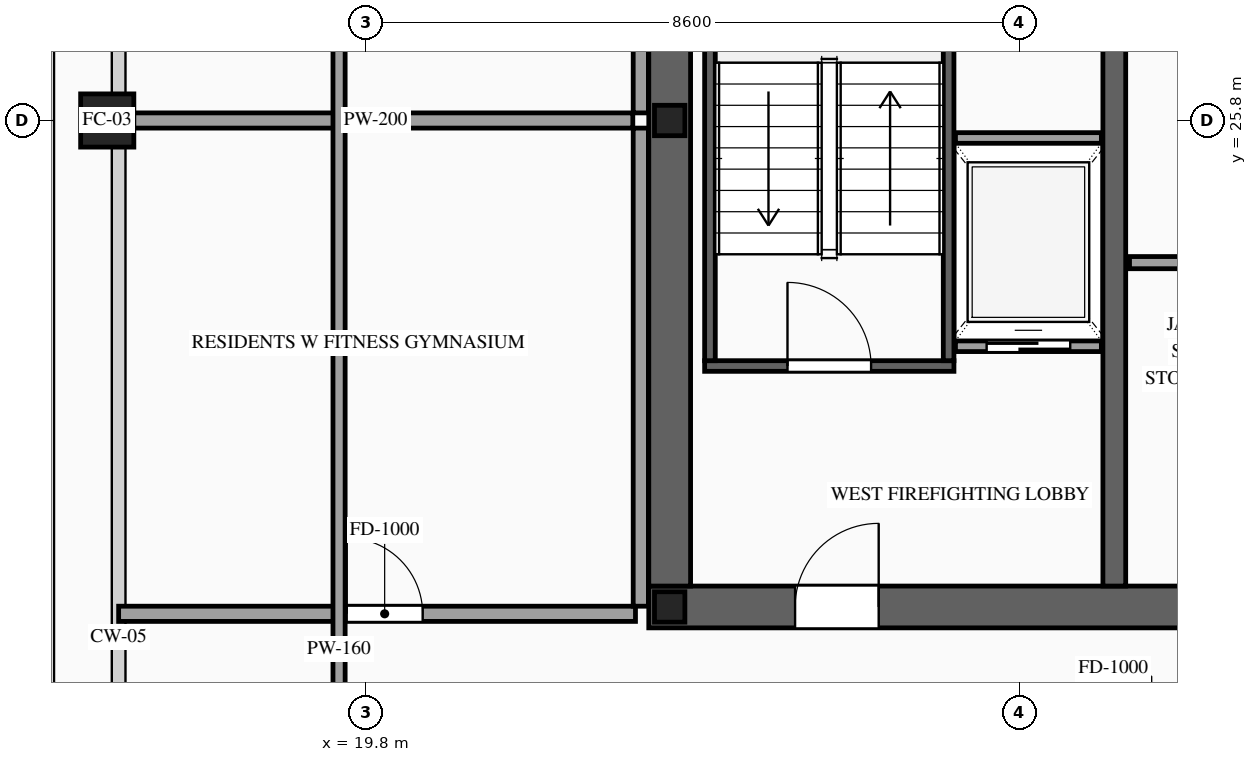
"""IFC4 building model, lengths in metres.
Left out: names, types, materials, properties, quantities, classifications, styles, units other than length and angle.
Written with IfcOpenShell. Run it as: python <this file> out.ifc"""

import sys

from ifc_helpers import new_model, si_unit, direction, frame, frame_2d, origin, origin_2d, place, context, subcontext, project, spatial, rectangle, hollow_rectangle, i_section, extrude, source, transform, mapped, element, fill, save


model = new_model("IFC4")
c1 = context("Model", 3, precision=1e-05, world=origin(), true_north=direction((0.0, 1.0)))
c2 = subcontext(c1, "Body", "Model", "MODEL_VIEW")
j1 = project(units=[si_unit("LENGTHUNIT", "METRE"), si_unit("PLANEANGLEUNIT", "RADIAN")], contexts=[c1])
p1 = place(None, origin())
s1 = spatial("IfcSite", under=j1, at=p1, CompositionType="ELEMENT")
p2 = place(p1, origin())
s2 = spatial("IfcBuilding", under=s1, at=p2, CompositionType="ELEMENT")
p3 = place(p2, frame((0.0, 0.0, 255.6)))
s3 = spatial("IfcBuildingStorey", under=s2, at=p3, CompositionType="ELEMENT", Elevation=255.6)
p4 = place(p3, frame((23.525, 19.4, 0.0), z_axis=(0.0, 0.0, 1.0), x_axis=(1.0, 0.0, 0.0)))
e1 = element("IfcWall", 1, at=p4, inside=s3, PredefinedType="SHEAR", context=c2, shape_type="SweptSolid", body=[
    extrude(rectangle(XDim=26.95, YDim=0.55, at=frame_2d((13.475, 0.0))), origin(), (0.0, 0.0, 1.0), 3.5),
])
p5 = place(p4, frame((1.925, 0.0, 0.0)))
e2 = element("IfcOpeningElement", 2, at=p5, cuts=e1, PredefinedType="OPENING", context=c2, shape_type="SweptSolid", body=[
    extrude(rectangle(XDim=1.1, YDim=2.2, at=frame_2d((0.55, 1.1))), frame((0.0, 0.29, 0.0), z_axis=(0.0, -1.0, 0.0), x_axis=(1.0, 0.0, 0.0)), (0.0, 0.0, 1.0), 0.58),
])
p6 = place(p4, frame((9.825, 0.0, 0.0)))
e3 = element("IfcOpeningElement", 3, at=p6, cuts=e1, PredefinedType="OPENING", context=c2, shape_type="SweptSolid", body=[
    extrude(rectangle(XDim=1.1, YDim=2.2, at=frame_2d((0.55, 1.1))), frame((0.0, 0.29, 0.0), z_axis=(0.0, -1.0, 0.0), x_axis=(1.0, 0.0, 0.0)), (0.0, 0.0, 1.0), 0.58),
])
p7 = place(p4, frame((23.025, 0.0, 0.0)))
e4 = element("IfcOpeningElement", 4, at=p7, cuts=e1, PredefinedType="OPENING", context=c2, shape_type="SweptSolid", body=[
    extrude(rectangle(XDim=1.1, YDim=2.2, at=frame_2d((0.55, 1.1))), frame((0.0, 0.29, 0.0), z_axis=(0.0, -1.0, 0.0), x_axis=(1.0, 0.0, 0.0)), (0.0, 0.0, 1.0), 0.58),
])
p8 = place(p4, frame((19.645, 0.0, 0.0)))
e5 = element("IfcOpeningElement", 5, at=p8, cuts=e1, PredefinedType="OPENING", context=c2, shape_type="SweptSolid", body=[
    extrude(rectangle(XDim=0.9, YDim=2.15, at=frame_2d((0.45, 1.075))), frame((0.0, 0.29, 0.0), z_axis=(0.0, -1.0, 0.0), x_axis=(1.0, 0.0, 0.0)), (0.0, 0.0, 1.0), 0.58),
])
p9 = place(p4, frame((18.205, 0.0, 0.0)))
e6 = element("IfcOpeningElement", 6, at=p9, cuts=e1, PredefinedType="OPENING", context=c2, shape_type="SweptSolid", body=[
    extrude(rectangle(XDim=0.9, YDim=2.15, at=frame_2d((0.45, 1.075))), frame((0.0, 0.29, 0.0), z_axis=(0.0, -1.0, 0.0), x_axis=(1.0, 0.0, 0.0)), (0.0, 0.0, 1.0), 0.58),
])
m1 = source(origin(), c2, "Body", "SweptSolid", [
    extrude(rectangle(XDim=12.25, YDim=0.55, at=frame_2d((6.125, 0.0))), origin(), (0.0, 0.0, 1.0), 3.5),
])
p10 = place(p3, frame((23.8, 19.675, 0.0), z_axis=(0.0, 0.0, 1.0), x_axis=(0.0, 1.0, 0.0)))
e7 = element("IfcWall", 7, at=p10, inside=s3, PredefinedType="SHEAR", context=c2, shape_type="MappedRepresentation", body=[
    mapped(m1, transform((0.0, 0.0, 0.0), scale=1.0)),
])
m2 = source(origin(), c2, "Body", "SweptSolid", [
    extrude(rectangle(XDim=12.25, YDim=0.3, at=frame_2d((6.125, 0.0))), origin(), (0.0, 0.0, 1.0), 3.5),
])
p11 = place(p3, frame((29.65, 19.675, 0.0), z_axis=(0.0, 0.0, 1.0), x_axis=(0.0, 1.0, 0.0)))
e8 = element("IfcWall", 8, at=p11, inside=s3, PredefinedType="SOLIDWALL", context=c2, shape_type="MappedRepresentation", body=[
    mapped(m2, transform((0.0, 0.0, 0.0), scale=1.0)),
])
m3 = source(origin(), c2, "Body", "SweptSolid", [
    extrude(i_section(OverallWidth=0.4, OverallDepth=0.4, WebThickness=0.013, FlangeThickness=0.021, at=origin_2d()), origin(), (0.0, 0.0, 1.0), 3.5),
])
for number, where, z_axis, x_axis in (
    (9, (23.8, 19.4, 0.0), (0.0, 0.0, 1.0), (1.0, 0.0, 0.0)),
    (10, (23.8, 25.8, 0.0), (0.0, 0.0, 1.0), (1.0, 0.0, 0.0)),
):
    element("IfcColumn", number, at=place(p3, frame(where, z_axis=z_axis, x_axis=x_axis)), inside=s3, PredefinedType="COLUMN", context=c2, shape_type="MappedRepresentation", body=[
        mapped(m3, transform((0.0, 0.0, 0.0), scale=1.0)),
    ])
m4 = source(origin(), c2, "Body", "SweptSolid", [
    extrude(hollow_rectangle(XDim=0.7, YDim=0.7, WallThickness=0.032, at=origin_2d()), origin(), (0.0, 0.0, 1.0), 3.5),
])
p12 = place(p3, frame((16.4, 25.8, 0.0), z_axis=(0.0, 0.0, 1.0), x_axis=(1.0, 0.0, 0.0)))
e11 = element("IfcColumn", 11, at=p12, inside=s3, PredefinedType="COLUMN", context=c2, shape_type="MappedRepresentation", body=[
    mapped(m4, transform((0.0, 0.0, 0.0), scale=1.0)),
])
p13 = place(p3, frame((27.56, 22.83, 0.0), z_axis=(0.0, 0.0, 1.0), x_axis=(1.0, 0.0, 0.0)))
e12 = element("IfcWall", 12, at=p13, inside=s3, PredefinedType="SOLIDWALL", context=c2, shape_type="SweptSolid", body=[
    extrude(rectangle(XDim=1.92, YDim=0.14, at=frame_2d((0.96, 0.0))), origin(), (0.0, 0.0, 1.0), 3.2),
])
p14 = place(p13, frame((0.41, 0.0, 0.0)))
e13 = element("IfcOpeningElement", 13, at=p14, cuts=e12, PredefinedType="OPENING", context=c2, shape_type="SweptSolid", body=[
    extrude(rectangle(XDim=1.1, YDim=2.2, at=frame_2d((0.55, 1.1))), frame((0.0, 0.085, 0.0), z_axis=(0.0, -1.0, 0.0), x_axis=(1.0, 0.0, 0.0)), (0.0, 0.0, 1.0), 0.17),
])
m5 = source(origin(), c2, "Body", "SweptSolid", [
    extrude(rectangle(XDim=1.92, YDim=0.14, at=frame_2d((0.96, 0.0))), origin(), (0.0, 0.0, 1.0), 3.2),
])
p15 = place(p3, frame((27.56, 25.57, 0.0), z_axis=(0.0, 0.0, 1.0), x_axis=(1.0, 0.0, 0.0)))
e14 = element("IfcWall", 14, at=p15, inside=s3, PredefinedType="SOLIDWALL", context=c2, shape_type="MappedRepresentation", body=[
    mapped(m5, transform((0.0, 0.0, 0.0), scale=1.0)),
])
p16 = place(p3, frame((24.26, 22.57, 0.0), z_axis=(0.0, 0.0, 1.0), x_axis=(1.0, 0.0, 0.0)))
e15 = element("IfcWall", 15, at=p16, inside=s3, PredefinedType="SOLIDWALL", context=c2, shape_type="SweptSolid", body=[
    extrude(rectangle(XDim=3.28, YDim=0.14, at=frame_2d((1.64, 0.0))), origin(), (0.0, 0.0, 1.0), 3.2),
])
p17 = place(p16, frame((1.09, 0.0, 0.0)))
e16 = element("IfcOpeningElement", 16, at=p17, cuts=e15, PredefinedType="OPENING", context=c2, shape_type="SweptSolid", body=[
    extrude(rectangle(XDim=1.1, YDim=2.2, at=frame_2d((0.55, 1.1))), frame((0.0, 0.085, 0.0), z_axis=(0.0, -1.0, 0.0), x_axis=(1.0, 0.0, 0.0)), (0.0, 0.0, 1.0), 0.17),
])
m6 = source(origin(), c2, "Body", "SweptSolid", [
    extrude(rectangle(XDim=8.94, YDim=0.14, at=frame_2d((4.47, 0.0))), origin(), (0.0, 0.0, 1.0), 3.2),
])
for number, where, z_axis, x_axis in (
    (17, (24.33, 22.64, 0.0), (0.0, 0.0, 1.0), (0.0, 1.0, 0.0)),
    (18, (27.47, 22.64, 0.0), (0.0, 0.0, 1.0), (0.0, 1.0, 0.0)),
):
    element("IfcWall", number, at=place(p3, frame(where, z_axis=z_axis, x_axis=x_axis)), inside=s3, PredefinedType="SOLIDWALL", context=c2, shape_type="MappedRepresentation", body=[
        mapped(m6, transform((0.0, 0.0, 0.0), scale=1.0)),
    ])
m7 = source(origin(), c2, "Body", "SweptSolid", [
    extrude(rectangle(XDim=2.47, YDim=0.16, at=frame_2d((1.235, 0.0))), origin(), (0.0, 0.0, 1.0), 3.2),
])
p18 = place(p3, frame((29.85, 23.93, 0.0), z_axis=(0.0, 0.0, 1.0), x_axis=(1.0, 0.0, 0.0)))
e19 = element("IfcWall", 19, at=p18, inside=s3, PredefinedType="PARTITIONING", context=c2, shape_type="MappedRepresentation", body=[
    mapped(m7, transform((0.0, 0.0, 0.0), scale=1.0)),
])
p19 = place(p3, frame((16.55, 19.31, 0.0), z_axis=(0.0, 0.0, 1.0), x_axis=(1.0, 0.0, 0.0)))
e20 = element("IfcWall", 20, at=p19, inside=s3, PredefinedType="PARTITIONING", context=c2, shape_type="SweptSolid", body=[
    extrude(rectangle(XDim=6.8, YDim=0.2, at=frame_2d((3.4, 0.0))), origin(), (0.0, 0.0, 1.0), 2.745),
])
p20 = place(p19, frame((3.0, 0.0, 0.0)))
e21 = element("IfcOpeningElement", 21, at=p20, cuts=e20, PredefinedType="OPENING", context=c2, shape_type="SweptSolid", body=[
    extrude(rectangle(XDim=1.0, YDim=2.2, at=frame_2d((0.5, 1.1))), frame((0.0, 0.115, 0.0), z_axis=(0.0, -1.0, 0.0), x_axis=(1.0, 0.0, 0.0)), (0.0, 0.0, 1.0), 0.23),
])
m8 = source(origin(), c2, "Body", "SweptSolid", [
    extrude(rectangle(XDim=6.765, YDim=0.2, at=frame_2d((3.382, 0.0))), origin(), (0.0, 0.0, 1.0), 2.707),
])
p21 = place(p3, frame((16.55, 25.8, 0.0), z_axis=(0.0, 0.0, 1.0), x_axis=(1.0, 0.0, 0.0)))
e22 = element("IfcWall", 22, at=p21, inside=s3, PredefinedType="PARTITIONING", context=c2, shape_type="MappedRepresentation", body=[
    mapped(m8, transform((0.0, 0.0, 0.0), scale=1.0)),
])
m9 = source(origin(), c2, "Body", "SweptSolid", [
    extrude(rectangle(XDim=6.29, YDim=0.2, at=frame_2d((3.145, 0.0))), origin(), (0.0, 0.0, 1.0), 3.2),
])
p22 = place(p3, frame((23.42, 19.41, 0.0), z_axis=(0.0, 0.0, 1.0), x_axis=(0.0, 1.0, 0.0)))
e23 = element("IfcWall", 23, at=p22, inside=s3, PredefinedType="PARTITIONING", context=c2, shape_type="MappedRepresentation", body=[
    mapped(m9, transform((0.0, 0.0, 0.0), scale=1.0)),
])
m10 = source(origin(), c2, "Body", "SweptSolid", [
    extrude(rectangle(XDim=26.69, YDim=0.16, at=frame_2d((13.345, 0.0))), origin(), (0.0, 0.0, 1.0), 3.2),
])
p23 = place(p3, frame((19.45, 5.5, 0.0), z_axis=(0.0, 0.0, 1.0), x_axis=(0.0, 1.0, 0.0)))
e24 = element("IfcWall", 24, at=p23, inside=s3, PredefinedType="PARTITIONING", context=c2, shape_type="MappedRepresentation", body=[
    mapped(m10, transform((0.0, 0.0, 0.0), scale=1.0)),
])
p24 = place(p3, frame((23.42, 25.9, 0.0), z_axis=(0.0, 0.0, 1.0), x_axis=(0.0, 1.0, 0.0)))
e25 = element("IfcWall", 25, at=p24, inside=s3, PredefinedType="PARTITIONING", context=c2, shape_type="MappedRepresentation", body=[
    mapped(m9, transform((0.0, 0.0, 0.0), scale=1.0)),
])
m11 = source(origin(), c2, "Body", "SweptSolid", [
    extrude(rectangle(XDim=1.1, YDim=2.2, at=frame_2d((0.55, 1.1))), frame((0.0, 0.025, 0.0), z_axis=(0.0, -1.0, 0.0), x_axis=(1.0, 0.0, 0.0)), (0.0, 0.0, 1.0), 0.05),
])
p25 = place(p14, origin())
e26 = element("IfcDoor", 26, at=p25, inside=s3, OperationType="SLIDING_TO_LEFT", PredefinedType="DOOR", context=c2, shape_type="MappedRepresentation", body=[
    mapped(m11, transform((0.0, 0.0, 0.0), scale=1.0)),
])
fill(e13, e26)
m12 = source(origin(), c2, "Body", "SweptSolid", [
    extrude(rectangle(XDim=1.1, YDim=2.2, at=frame_2d((0.55, 1.1))), frame((0.0, 0.025, 0.0), z_axis=(0.0, -1.0, 0.0), x_axis=(1.0, 0.0, 0.0)), (0.0, 0.0, 1.0), 0.05),
])
p26 = place(p17, origin())
e27 = element("IfcDoor", 27, at=p26, inside=s3, OperationType="SINGLE_SWING_LEFT", PredefinedType="DOOR", context=c2, shape_type="MappedRepresentation", body=[
    mapped(m12, transform((0.0, 0.0, 0.0), scale=1.0)),
])
fill(e16, e27)
p27 = place(p5, origin())
e28 = element("IfcDoor", 28, at=p27, inside=s3, OperationType="SINGLE_SWING_RIGHT", PredefinedType="DOOR", context=c2, shape_type="MappedRepresentation", body=[
    mapped(m12, transform((0.0, 0.0, 0.0), scale=1.0)),
])
fill(e2, e28)
m13 = source(origin(), c2, "Body", "SweptSolid", [
    extrude(rectangle(XDim=1.0, YDim=2.2, at=frame_2d((0.5, 1.1))), frame((0.0, 0.025, 0.0), z_axis=(0.0, -1.0, 0.0), x_axis=(1.0, 0.0, 0.0)), (0.0, 0.0, 1.0), 0.05),
])
p28 = place(p20, origin())
e29 = element("IfcDoor", 29, at=p28, inside=s3, OperationType="SINGLE_SWING_LEFT", PredefinedType="DOOR", context=c2, shape_type="MappedRepresentation", body=[
    mapped(m13, transform((0.0, 0.0, 0.0), scale=1.0)),
])
fill(e21, e29)
save(model, sys.argv[1])
